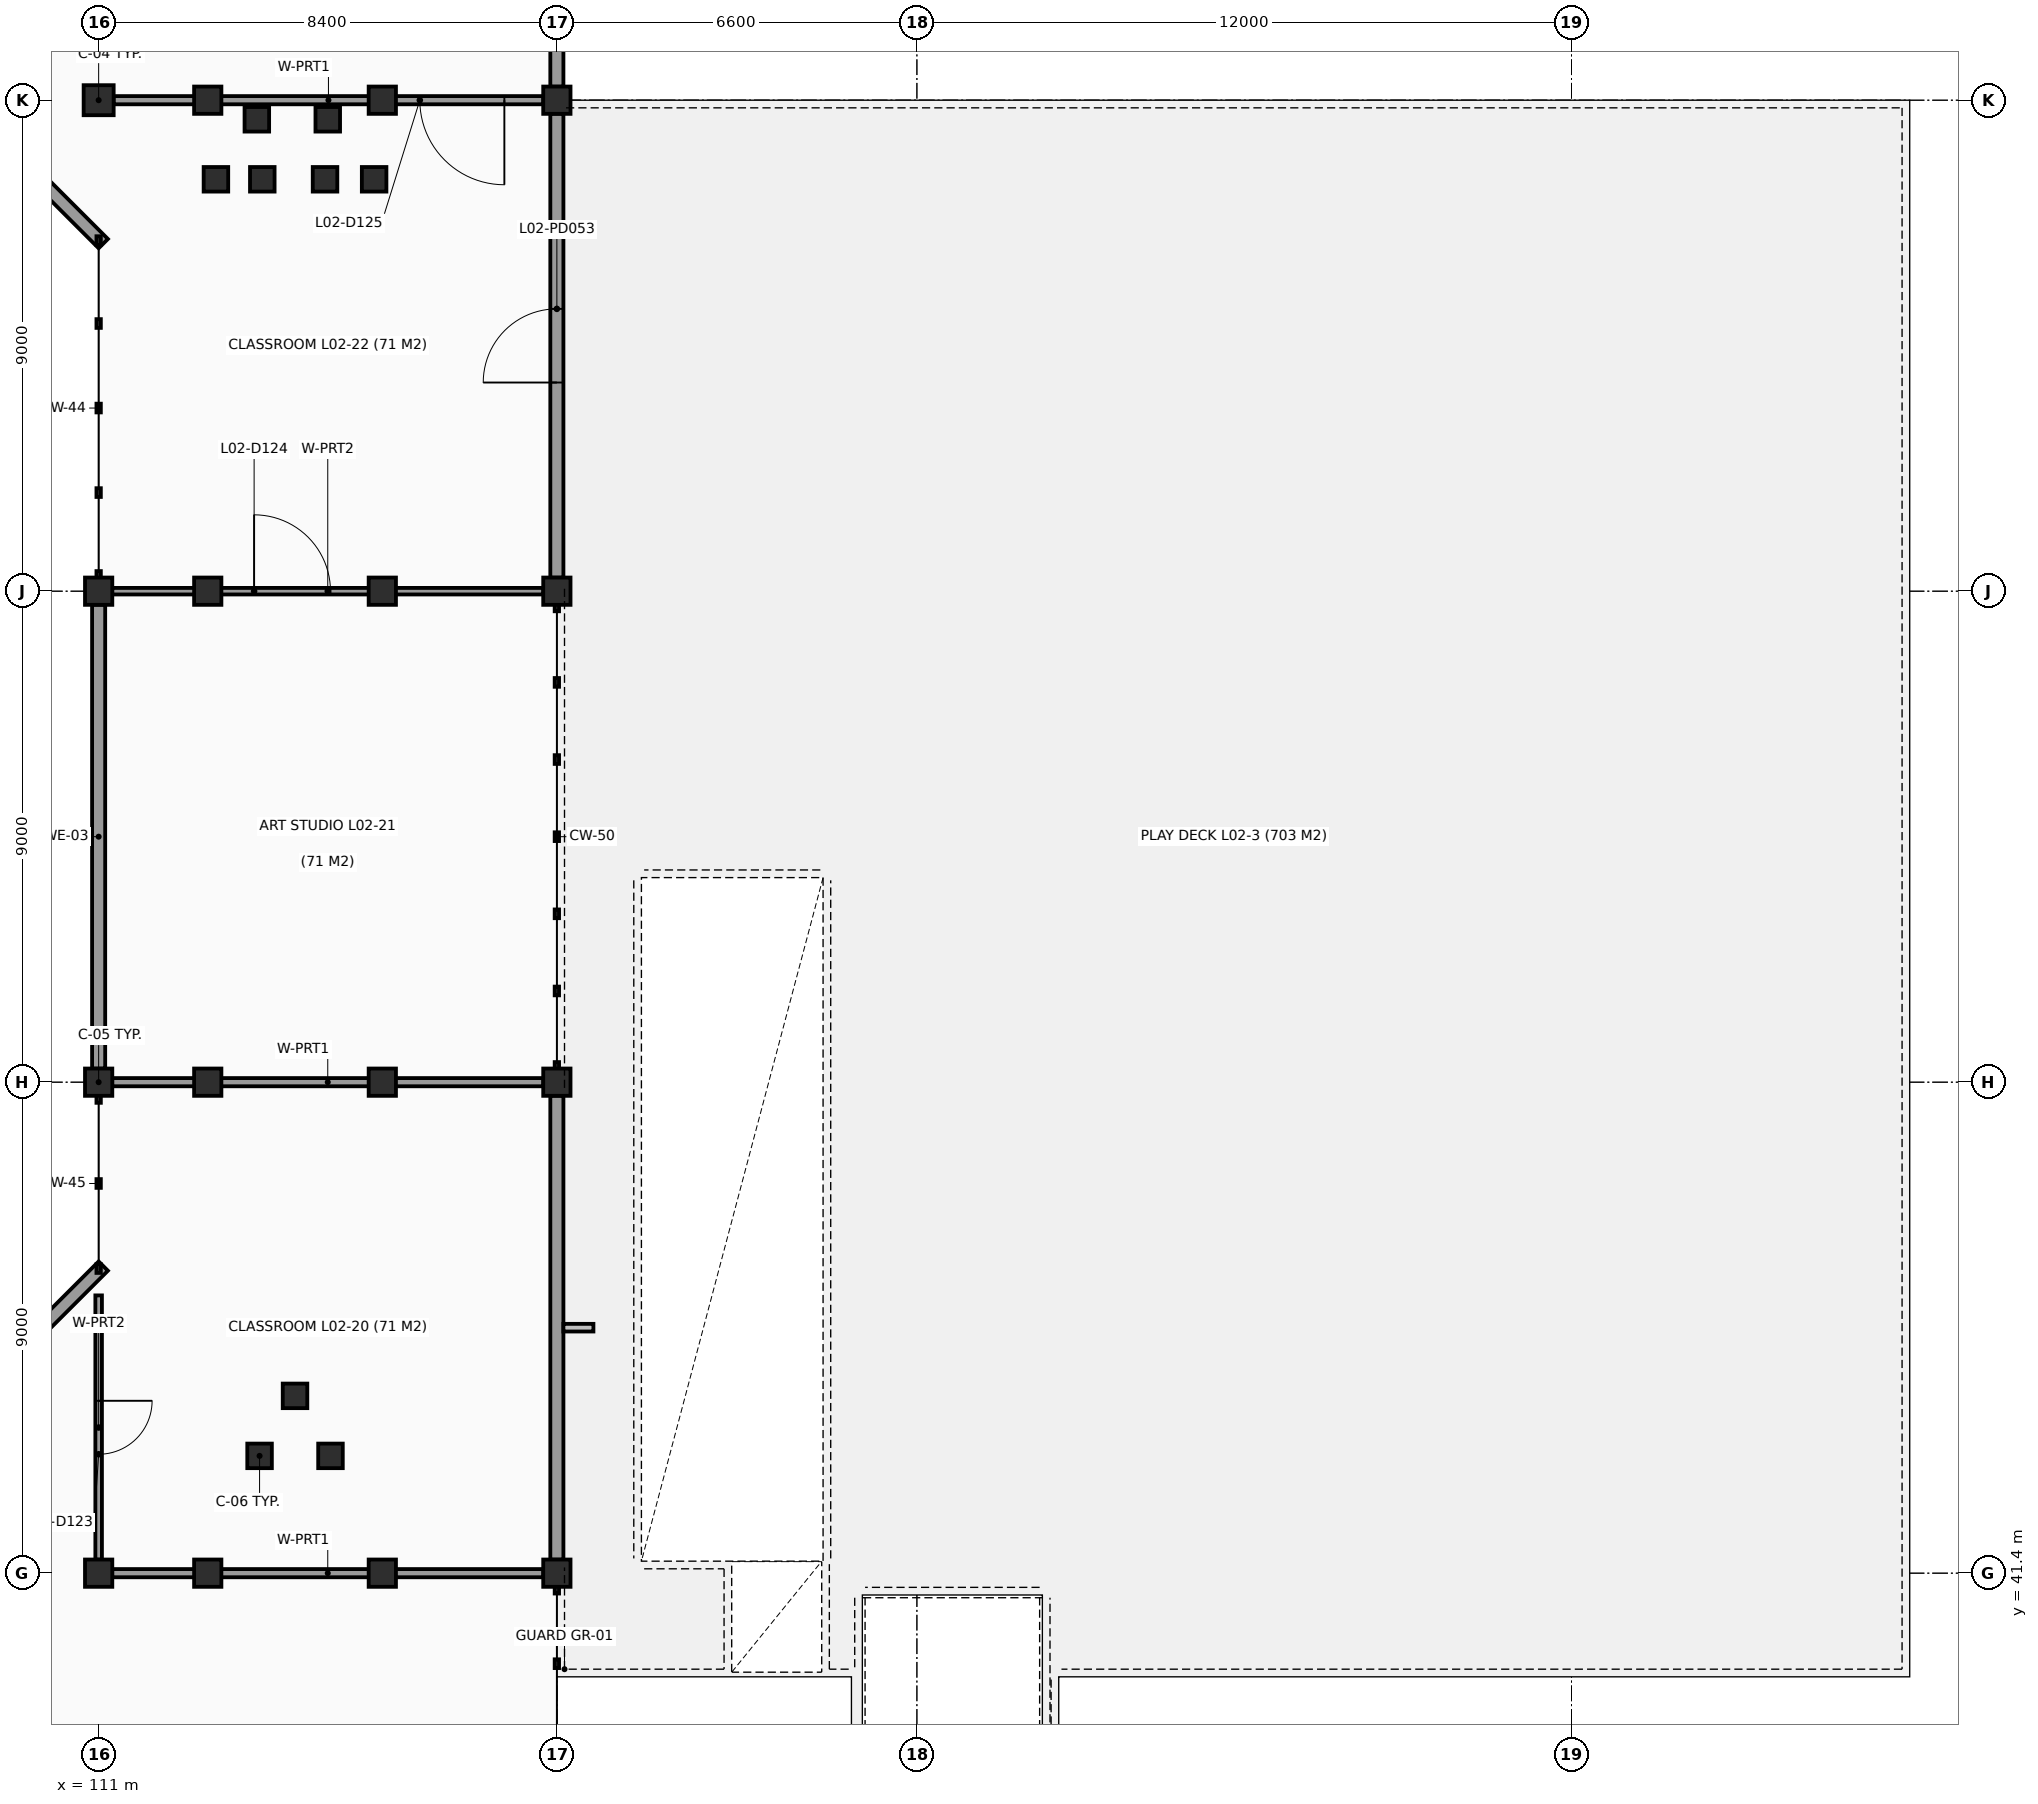
"""IFC4 building model, lengths in metres.
Left out: names, types, materials, properties, quantities, classifications, styles, units other than length and angle.
Written with IfcOpenShell. Run it as: python <this file> out.ifc"""

import sys

from ifc_helpers import new_model, si_unit, direction, frame, frame_2d, origin, origin_2d, place, context, subcontext, project, spatial, rectangle, hollow_circle, i_section, extrude, element, fill, save


model = new_model("IFC4")
c1 = context("Model", 3, precision=1e-05, world=origin(), true_north=direction((0.0, 1.0)))
c2 = subcontext(c1, "Body", "Model", "MODEL_VIEW")
j1 = project(units=[si_unit("LENGTHUNIT", "METRE"), si_unit("PLANEANGLEUNIT", "RADIAN")], contexts=[c1])
p1 = place(None, origin())
s1 = spatial("IfcSite", under=j1, at=p1, CompositionType="ELEMENT")
p2 = place(p1, origin())
s2 = spatial("IfcBuilding", under=s1, at=p2, CompositionType="ELEMENT")
p3 = place(p2, frame((0.0, 0.0, 7.8)))
s3 = spatial("IfcBuildingStorey", under=s2, at=p3, CompositionType="ELEMENT", Elevation=7.8)
for number, where, z_axis, x_axis in (
    (1, (111.0, 41.4, 0.0), (0.0, 0.0, 1.0), (1.0, 0.0, 0.0)),
    (2, (111.0, 50.4, 0.0), (0.0, 0.0, 1.0), (1.0, 0.0, 0.0)),
    (3, (111.0, 59.4, 0.0), (0.0, 0.0, 1.0), (1.0, 0.0, 0.0)),
):
    element("IfcColumn", number, at=place(p3, frame(where, z_axis=z_axis, x_axis=x_axis)), inside=s3, PredefinedType="COLUMN", context=c2, shape_type="SweptSolid", body=[
        extrude(rectangle(XDim=0.5, YDim=0.5, at=origin_2d()), origin(), (0.0, 0.0, 1.0), 3.6),
    ])
p4 = place(p3, frame((111.0, 68.4, 0.0), z_axis=(0.0, 0.0, 1.0), x_axis=(1.0, 0.0, 0.0)))
e4 = element("IfcColumn", 4, at=p4, inside=s3, PredefinedType="COLUMN", context=c2, shape_type="SweptSolid", body=[
    extrude(rectangle(XDim=0.55, YDim=0.55, at=origin_2d()), origin(), (0.0, 0.0, 1.0), 3.6),
])
for number, where, z_axis, x_axis in (
    (5, (119.4, 41.4, 0.0), (0.0, 0.0, 1.0), (1.0, 0.0, 0.0)),
    (6, (119.4, 50.4, 0.0), (0.0, 0.0, 1.0), (1.0, 0.0, 0.0)),
    (7, (119.4, 59.4, 0.0), (0.0, 0.0, 1.0), (1.0, 0.0, 0.0)),
    (8, (119.4, 68.4, 0.0), (0.0, 0.0, 1.0), (1.0, 0.0, 0.0)),
):
    element("IfcColumn", number, at=place(p3, frame(where, z_axis=z_axis, x_axis=x_axis)), inside=s3, PredefinedType="COLUMN", context=c2, shape_type="SweptSolid", body=[
        extrude(rectangle(XDim=0.5, YDim=0.5, at=origin_2d()), origin(), (0.0, 0.0, 1.0), 3.34),
    ])
p5 = place(p3, frame((116.2, 41.4, 0.0), z_axis=(0.0, 0.0, 1.0), x_axis=(1.0, 0.0, 0.0)))
e9 = element("IfcColumn", 9, at=p5, inside=s3, PredefinedType="COLUMN", context=c2, shape_type="SweptSolid", body=[
    extrude(rectangle(XDim=0.5, YDim=0.5, at=origin_2d()), origin(), (0.0, 0.0, 1.0), 3.28),
])
for number, where, z_axis, x_axis in (
    (10, (116.2, 50.4, 0.0), (0.0, 0.0, 1.0), (1.0, 0.0, 0.0)),
    (11, (116.2, 59.4, 0.0), (0.0, 0.0, 1.0), (1.0, 0.0, 0.0)),
    (12, (116.2, 68.4, 0.0), (0.0, 0.0, 1.0), (1.0, 0.0, 0.0)),
    (13, (113.0, 41.4, 0.0), (0.0, 0.0, 1.0), (1.0, 0.0, 0.0)),
    (14, (113.0, 50.4, 0.0), (0.0, 0.0, 1.0), (1.0, 0.0, 0.0)),
    (15, (113.0, 59.4, 0.0), (0.0, 0.0, 1.0), (1.0, 0.0, 0.0)),
    (16, (113.0, 68.4, 0.0), (0.0, 0.0, 1.0), (1.0, 0.0, 0.0)),
):
    element("IfcColumn", number, at=place(p3, frame(where, z_axis=z_axis, x_axis=x_axis)), inside=s3, PredefinedType="COLUMN", context=c2, shape_type="SweptSolid", body=[
        extrude(rectangle(XDim=0.5, YDim=0.5, at=origin_2d()), origin(), (0.0, 0.0, 1.0), 3.6),
    ])
p6 = place(p2, frame((0.0, 0.0, 4.2)))
s4 = spatial("IfcBuildingStorey", under=s2, at=p6, CompositionType="ELEMENT", Elevation=4.2)
p7 = place(p6, frame((138.837, 38.572, 0.0), z_axis=(0.0, 0.0, 1.0), x_axis=(1.0, 0.0, 0.0)))
e17 = element("IfcColumn", 17, at=p7, inside=s4, PredefinedType="COLUMN", context=c2, shape_type="SweptSolid", body=[
    extrude(hollow_circle(Radius=0.178, WallThickness=0.016, at=origin_2d()), origin(), (0.0, 0.0, 1.0), 6.0),
])
p8 = place(p6, frame((140.384, 41.224, 0.0), z_axis=(0.0, 0.0, 1.0), x_axis=(0.887010833178, -0.461748613235, 0.0)))
e18 = element("IfcColumn", 18, at=p8, inside=s4, PredefinedType="COLUMN", context=c2, shape_type="SweptSolid", body=[
    extrude(i_section(OverallWidth=0.3, OverallDepth=0.45, WebThickness=0.014, FlangeThickness=0.026, FilletRadius=0.027, at=origin_2d()), origin(), (0.0, 0.0, 1.0), 6.0),
])
p9 = place(p6, frame((141.67, 44.013, 0.0), z_axis=(0.0, 0.0, 1.0), x_axis=(1.0, 0.0, 0.0)))
e19 = element("IfcColumn", 19, at=p9, inside=s4, PredefinedType="COLUMN", context=c2, shape_type="SweptSolid", body=[
    extrude(hollow_circle(Radius=0.178, WallThickness=0.016, at=origin_2d()), origin(), (0.0, 0.0, 1.0), 6.0),
])
p10 = place(p6, frame((142.682, 46.912, 0.0), z_axis=(0.0, 0.0, 1.0), x_axis=(0.958819734868, -0.284015344704, 0.0)))
e20 = element("IfcColumn", 20, at=p10, inside=s4, PredefinedType="COLUMN", context=c2, shape_type="SweptSolid", body=[
    extrude(i_section(OverallWidth=0.3, OverallDepth=0.45, WebThickness=0.014, FlangeThickness=0.026, FilletRadius=0.027, at=origin_2d()), origin(), (0.0, 0.0, 1.0), 6.0),
])
p11 = place(p6, frame((143.412, 49.894, 0.0), z_axis=(0.0, 0.0, 1.0), x_axis=(1.0, 0.0, 0.0)))
e21 = element("IfcColumn", 21, at=p11, inside=s4, PredefinedType="COLUMN", context=c2, shape_type="SweptSolid", body=[
    extrude(hollow_circle(Radius=0.178, WallThickness=0.016, at=origin_2d()), origin(), (0.0, 0.0, 1.0), 6.0),
])
p12 = place(p6, frame((143.853, 52.933, 0.0), z_axis=(0.0, 0.0, 1.0), x_axis=(0.995396198367, -0.09584575252, 0.0)))
e22 = element("IfcColumn", 22, at=p12, inside=s4, PredefinedType="COLUMN", context=c2, shape_type="SweptSolid", body=[
    extrude(i_section(OverallWidth=0.3, OverallDepth=0.45, WebThickness=0.014, FlangeThickness=0.026, FilletRadius=0.027, at=origin_2d()), origin(), (0.0, 0.0, 1.0), 6.0),
])
p13 = place(p6, frame((144.0, 56.0, 0.0), z_axis=(0.0, 0.0, 1.0), x_axis=(1.0, 0.0, 0.0)))
e23 = element("IfcColumn", 23, at=p13, inside=s4, PredefinedType="COLUMN", context=c2, shape_type="SweptSolid", body=[
    extrude(hollow_circle(Radius=0.178, WallThickness=0.016, at=origin_2d()), origin(), (0.0, 0.0, 1.0), 6.0),
])
p14 = place(p6, frame((143.853, 59.067, 0.0), z_axis=(0.0, 0.0, 1.0), x_axis=(0.995396198367, 0.09584575252, 0.0)))
e24 = element("IfcColumn", 24, at=p14, inside=s4, PredefinedType="COLUMN", context=c2, shape_type="SweptSolid", body=[
    extrude(i_section(OverallWidth=0.3, OverallDepth=0.45, WebThickness=0.014, FlangeThickness=0.026, FilletRadius=0.027, at=origin_2d()), origin(), (0.0, 0.0, 1.0), 6.0),
])
p15 = place(p6, frame((143.412, 62.106, 0.0), z_axis=(0.0, 0.0, 1.0), x_axis=(1.0, 0.0, 0.0)))
e25 = element("IfcColumn", 25, at=p15, inside=s4, PredefinedType="COLUMN", context=c2, shape_type="SweptSolid", body=[
    extrude(hollow_circle(Radius=0.178, WallThickness=0.016, at=origin_2d()), origin(), (0.0, 0.0, 1.0), 6.0),
])
p16 = place(p6, frame((142.682, 65.088, 0.0), z_axis=(0.0, 0.0, 1.0), x_axis=(0.958819734868, 0.284015344704, 0.0)))
e26 = element("IfcColumn", 26, at=p16, inside=s4, PredefinedType="COLUMN", context=c2, shape_type="SweptSolid", body=[
    extrude(i_section(OverallWidth=0.3, OverallDepth=0.45, WebThickness=0.014, FlangeThickness=0.026, FilletRadius=0.027, at=origin_2d()), origin(), (0.0, 0.0, 1.0), 6.0),
])
p17 = place(p6, frame((141.67, 67.987, 0.0), z_axis=(0.0, 0.0, 1.0), x_axis=(1.0, 0.0, 0.0)))
e27 = element("IfcColumn", 27, at=p17, inside=s4, PredefinedType="COLUMN", context=c2, shape_type="SweptSolid", body=[
    extrude(hollow_circle(Radius=0.178, WallThickness=0.016, at=origin_2d()), origin(), (0.0, 0.0, 1.0), 6.0),
])
for number, where, z_axis, x_axis in (
    (28, (113.95, 43.55, 0.0), (0.0, 0.0, 1.0), (1.0, 0.0, 0.0)),
    (29, (115.25, 43.55, 0.0), (0.0, 0.0, 1.0), (1.0, 0.0, 0.0)),
    (30, (114.6, 44.65, 0.0), (0.0, 0.0, 1.0), (1.0, 0.0, 0.0)),
    (31, (115.15, 66.95, 0.0), (0.0, 0.0, 1.0), (1.0, 0.0, 0.0)),
    (32, (116.05, 66.95, 0.0), (0.0, 0.0, 1.0), (1.0, 0.0, 0.0)),
    (33, (115.2, 68.05, 0.0), (0.0, 0.0, 1.0), (1.0, 0.0, 0.0)),
    (34, (113.15, 66.95, 0.0), (0.0, 0.0, 1.0), (1.0, 0.0, 0.0)),
    (35, (114.0, 66.95, 0.0), (0.0, 0.0, 1.0), (1.0, 0.0, 0.0)),
    (36, (113.9, 68.05, 0.0), (0.0, 0.0, 1.0), (1.0, 0.0, 0.0)),
):
    element("IfcColumn", number, at=place(p3, frame(where, z_axis=z_axis, x_axis=x_axis)), inside=s3, PredefinedType="COLUMN", context=c2, shape_type="SweptSolid", body=[
        extrude(rectangle(XDim=0.45, YDim=0.45, at=origin_2d()), origin(), (0.0, 0.0, 1.0), 3.6),
    ])
p18 = place(p3, frame((119.4, 71.077, 0.0), z_axis=(0.0, 0.0, 1.0), x_axis=(0.0, -1.0, 0.0)))
e37 = element("IfcWall", 37, at=p18, inside=s3, PredefinedType="SOLIDWALL", context=c2, shape_type="SweptSolid", body=[
    extrude(rectangle(XDim=2.429, YDim=0.24, at=frame_2d((1.214, 0.0))), origin(), (0.0, 0.0, 1.0), 2.58),
])
p19 = place(p3, frame((119.4, 68.152, 0.0), z_axis=(0.0, 0.0, 1.0), x_axis=(0.0, -1.0, 0.0)))
e38 = element("IfcWall", 38, at=p19, inside=s3, PredefinedType="SOLIDWALL", context=c2, shape_type="SweptSolid", body=[
    extrude(rectangle(XDim=8.504, YDim=0.24, at=frame_2d((4.252, 0.0))), origin(), (0.0, 0.0, 1.0), 2.58),
])
p20 = place(p19, frame((3.577, 0.0, 0.0)))
e39 = element("IfcOpeningElement", 39, at=p20, cuts=e38, PredefinedType="OPENING", context=c2, shape_type="SweptSolid", body=[
    extrude(rectangle(XDim=1.35, YDim=2.15, at=frame_2d((0.675, 1.075))), frame((0.0, 0.13, 0.0), z_axis=(0.0, -1.0, 0.0), x_axis=(1.0, 0.0, 0.0)), (0.0, 0.0, 1.0), 0.26),
])
p21 = place(p3, frame((119.4, 50.152, 0.0), z_axis=(0.0, 0.0, 1.0), x_axis=(0.0, -1.0, 0.0)))
e40 = element("IfcWall", 40, at=p21, inside=s3, PredefinedType="SOLIDWALL", context=c2, shape_type="SweptSolid", body=[
    extrude(rectangle(XDim=8.504, YDim=0.24, at=frame_2d((4.252, 0.0))), origin(), (0.0, 0.0, 1.0), 2.58),
])
p22 = place(p3, frame((105.371, 41.315, 0.0), z_axis=(0.0, 0.0, 1.0), x_axis=(0.707121887885, 0.707091674165, 0.0)))
e41 = element("IfcWall", 41, at=p22, inside=s3, PredefinedType="SOLIDWALL", context=c2, shape_type="SweptSolid", body=[
    extrude(rectangle(XDim=8.081, YDim=0.24, at=frame_2d((4.04, 0.0))), origin(), (0.0, 0.0, 1.0), 2.94),
])
p23 = place(p22, frame((2.54, 0.0, 0.95)))
e42 = element("IfcOpeningElement", 42, at=p23, cuts=e41, PredefinedType="OPENING", context=c2, shape_type="SweptSolid", body=[
    extrude(rectangle(XDim=3.0, YDim=1.5, at=frame_2d((1.5, 0.75))), frame((0.0, 0.13, 0.0), z_axis=(0.0, -1.0, 0.0), x_axis=(1.0, 0.0, 0.0)), (0.0, 0.0, 1.0), 0.26),
])
p24 = place(p3, frame((111.0, 50.648, 0.0), z_axis=(0.0, 0.0, 1.0), x_axis=(0.0, 1.0, 0.0)))
e43 = element("IfcWall", 43, at=p24, inside=s3, PredefinedType="SOLIDWALL", context=c2, shape_type="SweptSolid", body=[
    extrude(rectangle(XDim=8.504, YDim=0.24, at=frame_2d((4.252, 0.0))), origin(), (0.0, 0.0, 1.0), 2.64),
])
p25 = place(p3, frame((111.085, 65.771, 0.0), z_axis=(0.0, 0.0, 1.0), x_axis=(-0.707106781187, 0.707106781187, 0.0)))
e44 = element("IfcWall", 44, at=p25, inside=s3, PredefinedType="SOLIDWALL", context=c2, shape_type="SweptSolid", body=[
    extrude(rectangle(XDim=8.081, YDim=0.24, at=frame_2d((4.04, 0.0))), origin(), (0.0, 0.0, 1.0), 2.64),
])
p26 = place(p3, frame((111.248, 41.4, 0.0), z_axis=(0.0, 0.0, 1.0), x_axis=(1.0, 0.0, 0.0)))
e45 = element("IfcWall", 45, at=p26, inside=s3, PredefinedType="PARTITIONING", context=c2, shape_type="SweptSolid", body=[
    extrude(rectangle(XDim=7.904, YDim=0.15, at=frame_2d((3.952, 0.0))), origin(), (0.0, 0.0, 1.0), 2.89),
])
p27 = place(p3, frame((111.0, 41.648, 0.0), z_axis=(0.0, 0.0, 1.0), x_axis=(0.0, 1.0, 0.0)))
e46 = element("IfcWall", 46, at=p27, inside=s3, PredefinedType="PARTITIONING", context=c2, shape_type="SweptSolid", body=[
    extrude(rectangle(XDim=4.844, YDim=0.12, at=frame_2d((2.422, 0.0))), origin(), (0.0, 0.0, 1.0), 2.94),
])
p28 = place(p27, frame((1.932, 0.0, 0.0)))
e47 = element("IfcOpeningElement", 47, at=p28, cuts=e46, PredefinedType="OPENING", context=c2, shape_type="SweptSolid", body=[
    extrude(rectangle(XDim=0.98, YDim=2.12, at=frame_2d((0.49, 1.06))), frame((0.0, 0.07, 0.0), z_axis=(0.0, -1.0, 0.0), x_axis=(1.0, 0.0, 0.0)), (0.0, 0.0, 1.0), 0.14),
])
p29 = place(p3, frame((111.248, 50.4, 0.0), z_axis=(0.0, 0.0, 1.0), x_axis=(1.0, 0.0, 0.0)))
e48 = element("IfcWall", 48, at=p29, inside=s3, PredefinedType="PARTITIONING", context=c2, shape_type="SweptSolid", body=[
    extrude(rectangle(XDim=7.904, YDim=0.15, at=frame_2d((3.952, 0.0))), origin(), (0.0, 0.0, 1.0), 2.53),
])
p30 = place(p3, frame((111.248, 59.4, 0.0), z_axis=(0.0, 0.0, 1.0), x_axis=(1.0, 0.0, 0.0)))
e49 = element("IfcWall", 49, at=p30, inside=s3, PredefinedType="PARTITIONING", context=c2, shape_type="SweptSolid", body=[
    extrude(rectangle(XDim=7.904, YDim=0.12, at=frame_2d((3.952, 0.0))), origin(), (0.0, 0.0, 1.0), 2.63),
])
p31 = place(p30, frame((2.602, 0.0, 0.0)))
e50 = element("IfcOpeningElement", 50, at=p31, cuts=e49, PredefinedType="OPENING", context=c2, shape_type="SweptSolid", body=[
    extrude(rectangle(XDim=1.4, YDim=2.2, at=frame_2d((0.7, 1.1))), frame((0.0, 0.07, 0.0), z_axis=(0.0, -1.0, 0.0), x_axis=(1.0, 0.0, 0.0)), (0.0, 0.0, 1.0), 0.14),
])
p32 = place(p3, frame((111.273, 68.4, 0.0), z_axis=(0.0, 0.0, 1.0), x_axis=(1.0, 0.0, 0.0)))
e51 = element("IfcWall", 51, at=p32, inside=s3, PredefinedType="PARTITIONING", context=c2, shape_type="SweptSolid", body=[
    extrude(rectangle(XDim=7.879, YDim=0.15, at=frame_2d((3.939, 0.0))), origin(), (0.0, 0.0, 1.0), 2.48),
])
p33 = place(p32, frame((5.615, 0.0, 0.0)))
e52 = element("IfcOpeningElement", 52, at=p33, cuts=e51, PredefinedType="OPENING", context=c2, shape_type="SweptSolid", body=[
    extrude(rectangle(XDim=1.55, YDim=2.2, at=frame_2d((0.775, 1.1))), frame((0.0, 0.085, 0.0), z_axis=(0.0, -1.0, 0.0), x_axis=(1.0, 0.0, 0.0)), (0.0, 0.0, 1.0), 0.17),
])
p34 = place(p20, origin())
e53 = element("IfcDoor", 53, at=p34, inside=s3, OperationType="SINGLE_SWING_RIGHT", PredefinedType="DOOR", context=c2, shape_type="SweptSolid", body=[
    extrude(rectangle(XDim=1.35, YDim=2.15, at=frame_2d((0.675, 1.075))), frame((0.0, 0.025, 0.0), z_axis=(0.0, -1.0, 0.0), x_axis=(1.0, 0.0, 0.0)), (0.0, 0.0, 1.0), 0.05),
])
fill(e39, e53)
p35 = place(p28, origin())
e54 = element("IfcDoor", 54, at=p35, inside=s3, OperationType="SINGLE_SWING_RIGHT", PredefinedType="DOOR", context=c2, shape_type="SweptSolid", body=[
    extrude(rectangle(XDim=0.98, YDim=2.12, at=frame_2d((0.49, 1.06))), frame((0.0, 0.025, 0.0), z_axis=(0.0, -1.0, 0.0), x_axis=(1.0, 0.0, 0.0)), (0.0, 0.0, 1.0), 0.05),
])
fill(e47, e54)
p36 = place(p31, origin())
e55 = element("IfcDoor", 55, at=p36, inside=s3, OperationType="SINGLE_SWING_LEFT", PredefinedType="DOOR", context=c2, shape_type="SweptSolid", body=[
    extrude(rectangle(XDim=1.4, YDim=2.2, at=frame_2d((0.7, 1.1))), frame((0.0, 0.025, 0.0), z_axis=(0.0, -1.0, 0.0), x_axis=(1.0, 0.0, 0.0)), (0.0, 0.0, 1.0), 0.05),
])
fill(e50, e55)
p37 = place(p33, origin())
e56 = element("IfcDoor", 56, at=p37, inside=s3, OperationType="DOUBLE_DOOR_SINGLE_SWING", PredefinedType="DOOR", context=c2, shape_type="SweptSolid", body=[
    extrude(rectangle(XDim=1.55, YDim=2.2, at=frame_2d((0.775, 1.1))), frame((0.0, 0.025, 0.0), z_axis=(0.0, -1.0, 0.0), x_axis=(1.0, 0.0, 0.0)), (0.0, 0.0, 1.0), 0.05),
])
fill(e52, e56)
save(model, sys.argv[1])
